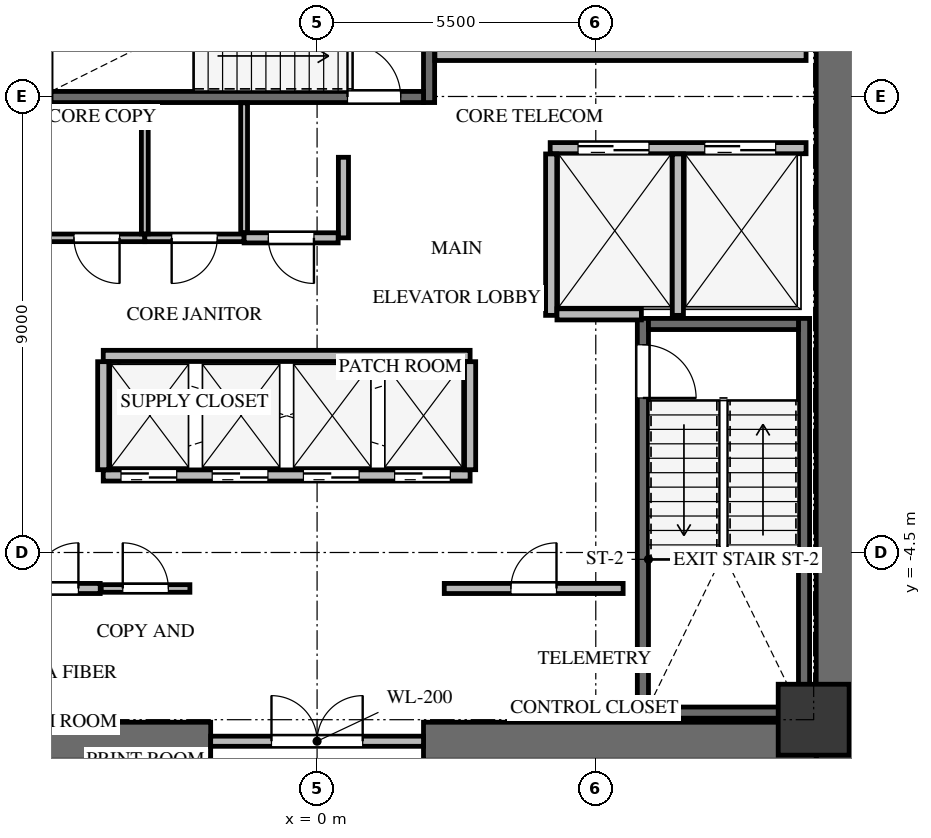
"""IFC4 building model, lengths in metres.
Left out: names, types, materials, properties, quantities, classifications, styles, units other than length and angle.
Written with IfcOpenShell. Run it as: python <this file> out.ifc"""

import sys

from ifc_helpers import new_model, si_unit, direction, frame, frame_2d, origin, origin_2d, place, context, subcontext, project, spatial, rectangle, extrude, source, transform, mapped, element, fill, save


model = new_model("IFC4")
c1 = context("Model", 3, precision=1e-05, world=origin(), true_north=direction((0.0, 1.0)))
c2 = subcontext(c1, "Body", "Model", "MODEL_VIEW")
j1 = project(units=[si_unit("LENGTHUNIT", "METRE"), si_unit("PLANEANGLEUNIT", "RADIAN")], contexts=[c1])
p1 = place(None, origin())
s1 = spatial("IfcSite", under=j1, at=p1, CompositionType="ELEMENT")
p2 = place(p1, origin())
s2 = spatial("IfcBuilding", under=s1, at=p2, CompositionType="ELEMENT")
p3 = place(p2, frame((0.0, 0.0, 146.1)))
s3 = spatial("IfcBuildingStorey", under=s2, at=p3, CompositionType="ELEMENT", Elevation=146.1)
p4 = place(p3, frame((10.225, -8.6, 0.0), z_axis=(0.0, 0.0, 1.0), x_axis=(0.0, 1.0, 0.0)))
e1 = element("IfcWall", 1, at=p4, inside=s3, PredefinedType="SHEAR", context=c2, shape_type="SweptSolid", body=[
    extrude(rectangle(XDim=17.2, YDim=0.75, at=frame_2d((8.6, 0.0))), origin(), (0.0, 0.0, 1.0), 4.2),
])
for number, where, z_axis, x_axis in (
    (2, (-9.85, -8.225, 0.0), (0.0, 0.0, 1.0), (1.0, 0.0, 0.0)),
    (3, (2.1, -8.225, 0.0), (0.0, 0.0, 1.0), (1.0, 0.0, 0.0)),
):
    element("IfcWall", number, at=place(p3, frame(where, z_axis=z_axis, x_axis=x_axis)), inside=s3, PredefinedType="SHEAR", context=c2, shape_type="SweptSolid", body=[
        extrude(rectangle(XDim=7.75, YDim=0.75, at=frame_2d((3.875, 0.0))), origin(), (0.0, 0.0, 1.0), 4.2),
    ])
p5 = place(p3, frame((9.61, -7.77, -0.24), z_axis=(0.0, 0.0, 1.0), x_axis=(0.0, 1.0, 0.0)))
e4 = element("IfcWall", 4, at=p5, inside=s3, PredefinedType="SHEAR", context=c2, shape_type="SweptSolid", body=[
    extrude(rectangle(XDim=7.89, YDim=0.22, at=frame_2d((3.945, 0.0))), origin(), (0.0, 0.0, 1.0), 4.12),
])
p6 = place(p3, frame((6.43, 0.12, -0.24), z_axis=(0.0, 0.0, 1.0), x_axis=(0.0, -1.0, 0.0)))
e5 = element("IfcWall", 5, at=p6, inside=s3, PredefinedType="SHEAR", context=c2, shape_type="SweptSolid", body=[
    extrude(rectangle(XDim=7.89, YDim=0.22, at=frame_2d((3.945, 0.0))), origin(), (0.0, 0.0, 1.0), 4.12),
])
p7 = place(p6, frame((0.52, 0.0, 0.0)))
e6 = element("IfcOpeningElement", 6, at=p7, cuts=e5, PredefinedType="OPENING", context=c2, shape_type="SweptSolid", body=[
    extrude(rectangle(XDim=1.05, YDim=2.15, at=frame_2d((0.525, 1.075))), frame((0.0, 0.12, 0.0), z_axis=(0.0, -1.0, 0.0), x_axis=(1.0, 0.0, 0.0)), (0.0, 0.0, 1.0), 0.24),
])
for number, where, z_axis, x_axis in (
    (7, (6.54, -7.66, -0.24), (0.0, 0.0, 1.0), (1.0, 0.0, 0.0)),
    (8, (9.5, 0.01, -0.24), (0.0, 0.0, 1.0), (-1.0, 0.0, 0.0)),
):
    element("IfcWall", number, at=place(p3, frame(where, z_axis=z_axis, x_axis=x_axis)), inside=s3, PredefinedType="SHEAR", context=c2, shape_type="SweptSolid", body=[
        extrude(rectangle(XDim=2.96, YDim=0.22, at=frame_2d((1.48, 0.0))), origin(), (0.0, 0.0, 1.0), 4.12),
    ])
p8 = place(p3, frame((2.21, 4.38, -0.24), z_axis=(0.0, 0.0, 1.0), x_axis=(0.0, 1.0, 0.0)))
e9 = element("IfcWall", 9, at=p8, inside=s3, PredefinedType="SHEAR", context=c2, shape_type="SweptSolid", body=[
    extrude(rectangle(XDim=3.4, YDim=0.22, at=frame_2d((1.7, 0.0))), origin(), (0.0, 0.0, 1.0), 4.12),
])
p9 = place(p3, frame((-5.25, 4.49, -0.24), z_axis=(0.0, 0.0, 1.0), x_axis=(1.0, 0.0, 0.0)))
e10 = element("IfcWall", 10, at=p9, inside=s3, PredefinedType="SHEAR", context=c2, shape_type="SweptSolid", body=[
    extrude(rectangle(XDim=7.35, YDim=0.22, at=frame_2d((3.675, 0.0))), origin(), (0.0, 0.0, 1.0), 4.12),
])
p10 = place(p9, frame((5.85, 0.0, 0.0)))
e11 = element("IfcOpeningElement", 11, at=p10, cuts=e10, PredefinedType="OPENING", context=c2, shape_type="SweptSolid", body=[
    extrude(rectangle(XDim=1.05, YDim=2.15, at=frame_2d((0.525, 1.075))), frame((0.0, 0.12, 0.0), z_axis=(0.0, -1.0, 0.0), x_axis=(1.0, 0.0, 0.0)), (0.0, 0.0, 1.0), 0.24),
])
m1 = source(origin(), c2, "Body", "SweptSolid", [
    extrude(rectangle(XDim=1.4, YDim=1.4, at=origin_2d()), origin(), (0.0, 0.0, 1.0), 4.12),
])
p11 = place(p3, frame((9.8, -7.8, -0.24), z_axis=(0.0, 0.0, 1.0), x_axis=(1.0, 0.0, 0.0)))
e12 = element("IfcColumn", 12, at=p11, inside=s3, PredefinedType="COLUMN", context=c2, shape_type="MappedRepresentation", body=[
    mapped(m1, transform((0.0, 0.0, 0.0), x_axis=(1.0, 0.0, 0.0), y_axis=(0.0, 1.0, 0.0), z_axis=(0.0, 0.0, 1.0), scale=1.0)),
])
p12 = place(p3, frame((-2.1, -8.225, 0.0), z_axis=(0.0, 0.0, 1.0), x_axis=(1.0, 0.0, 0.0)))
e13 = element("IfcWall", 13, at=p12, inside=s3, PredefinedType="SOLIDWALL", context=c2, shape_type="SweptSolid", body=[
    extrude(rectangle(XDim=4.2, YDim=0.2, at=frame_2d((2.1, 0.0))), origin(), (0.0, 0.0, 1.0), 3.865),
])
p13 = place(p12, frame((1.2, 0.0, 0.0)))
e14 = element("IfcOpeningElement", 14, at=p13, cuts=e13, PredefinedType="OPENING", context=c2, shape_type="SweptSolid", body=[
    extrude(rectangle(XDim=1.8, YDim=2.15, at=frame_2d((0.9, 1.075))), frame((0.0, 0.11, 0.0), z_axis=(0.0, -1.0, 0.0), x_axis=(1.0, 0.0, 0.0)), (0.0, 0.0, 1.0), 0.22),
])
p14 = place(p3, frame((4.6, 3.48, 0.0), z_axis=(0.0, 0.0, 1.0), x_axis=(1.0, 0.0, 0.0)))
e15 = element("IfcWall", 15, at=p14, inside=s3, PredefinedType="SOLIDWALL", context=c2, shape_type="SweptSolid", body=[
    extrude(rectangle(XDim=5.05, YDim=0.22, at=frame_2d((2.525, 0.0))), origin(), (0.0, 0.0, 1.0), 3.865),
])
p15 = place(p14, frame((0.55, 0.0, 0.0)))
e16 = element("IfcOpeningElement", 16, at=p15, cuts=e15, PredefinedType="OPENING", context=c2, shape_type="SweptSolid", body=[
    extrude(rectangle(XDim=1.4, YDim=2.15, at=frame_2d((0.7, 1.075))), frame((0.0, 0.12, 0.0), z_axis=(0.0, -1.0, 0.0), x_axis=(1.0, 0.0, 0.0)), (0.0, 0.0, 1.0), 0.24),
])
p16 = place(p14, frame((3.05, 0.0, 0.0)))
e17 = element("IfcOpeningElement", 17, at=p16, cuts=e15, PredefinedType="OPENING", context=c2, shape_type="SweptSolid", body=[
    extrude(rectangle(XDim=1.4, YDim=2.15, at=frame_2d((0.7, 1.075))), frame((0.0, 0.12, 0.0), z_axis=(0.0, -1.0, 0.0), x_axis=(1.0, 0.0, 0.0)), (0.0, 0.0, 1.0), 0.24),
])
for number, where, z_axis, x_axis in (
    (18, (4.62, 0.18, 0.0), (0.0, 0.0, 1.0), (0.0, 1.0, 0.0)),
    (19, (7.12, 0.18, 0.0), (0.0, 0.0, 1.0), (0.0, 1.0, 0.0)),
):
    element("IfcWall", number, at=place(p3, frame(where, z_axis=z_axis, x_axis=x_axis)), inside=s3, PredefinedType="SOLIDWALL", context=c2, shape_type="SweptSolid", body=[
        extrude(rectangle(XDim=3.186, YDim=0.22, at=frame_2d((1.593, 0.0))), origin(), (0.0, 0.0, 1.0), 3.865),
    ])
p17 = place(p3, frame((4.734, 0.2, 0.0), z_axis=(0.0, 0.0, 1.0), x_axis=(1.0, 0.0, 0.0)))
e20 = element("IfcWall", 20, at=p17, inside=s3, PredefinedType="SOLIDWALL", context=c2, shape_type="SweptSolid", body=[
    extrude(rectangle(XDim=1.666, YDim=0.22, at=frame_2d((0.833, 0.0))), origin(), (0.0, 0.0, 1.0), 3.865),
])
p18 = place(p3, frame((-4.22, -2.98, 0.0), z_axis=(0.0, 0.0, 1.0), x_axis=(1.0, 0.0, 0.0)))
e21 = element("IfcWall", 21, at=p18, inside=s3, PredefinedType="SOLIDWALL", context=c2, shape_type="SweptSolid", body=[
    extrude(rectangle(XDim=7.24, YDim=0.22, at=frame_2d((3.62, 0.0))), origin(), (0.0, 0.0, 1.0), 3.865),
])
p19 = place(p18, frame((0.35, 0.0, 0.0)))
e22 = element("IfcOpeningElement", 22, at=p19, cuts=e21, PredefinedType="OPENING", context=c2, shape_type="SweptSolid", body=[
    extrude(rectangle(XDim=1.1, YDim=2.15, at=frame_2d((0.55, 1.075))), frame((0.0, 0.12, 0.0), z_axis=(0.0, -1.0, 0.0), x_axis=(1.0, 0.0, 0.0)), (0.0, 0.0, 1.0), 0.24),
])
p20 = place(p18, frame((2.15, 0.0, 0.0)))
e23 = element("IfcOpeningElement", 23, at=p20, cuts=e21, PredefinedType="OPENING", context=c2, shape_type="SweptSolid", body=[
    extrude(rectangle(XDim=1.1, YDim=2.15, at=frame_2d((0.55, 1.075))), frame((0.0, 0.12, 0.0), z_axis=(0.0, -1.0, 0.0), x_axis=(1.0, 0.0, 0.0)), (0.0, 0.0, 1.0), 0.24),
])
p21 = place(p18, frame((3.95, 0.0, 0.0)))
e24 = element("IfcOpeningElement", 24, at=p21, cuts=e21, PredefinedType="OPENING", context=c2, shape_type="SweptSolid", body=[
    extrude(rectangle(XDim=1.1, YDim=2.15, at=frame_2d((0.55, 1.075))), frame((0.0, 0.12, 0.0), z_axis=(0.0, -1.0, 0.0), x_axis=(1.0, 0.0, 0.0)), (0.0, 0.0, 1.0), 0.24),
])
p22 = place(p18, frame((5.75, 0.0, 0.0)))
e25 = element("IfcOpeningElement", 25, at=p22, cuts=e21, PredefinedType="OPENING", context=c2, shape_type="SweptSolid", body=[
    extrude(rectangle(XDim=1.1, YDim=2.15, at=frame_2d((0.55, 1.075))), frame((0.0, 0.12, 0.0), z_axis=(0.0, -1.0, 0.0), x_axis=(1.0, 0.0, 0.0)), (0.0, 0.0, 1.0), 0.24),
])
p23 = place(p3, frame((-4.22, -0.62, 0.0), z_axis=(0.0, 0.0, 1.0), x_axis=(1.0, 0.0, 0.0)))
e26 = element("IfcWall", 26, at=p23, inside=s3, PredefinedType="SOLIDWALL", context=c2, shape_type="SweptSolid", body=[
    extrude(rectangle(XDim=7.24, YDim=0.22, at=frame_2d((3.62, 0.0))), origin(), (0.0, 0.0, 1.0), 3.865),
])
for number, where, z_axis, x_axis in (
    (27, (-4.22, -2.866, 0.0), (0.0, 0.0, 1.0), (0.0, 1.0, 0.0)),
    (28, (3.02, -2.866, 0.0), (0.0, 0.0, 1.0), (0.0, 1.0, 0.0)),
):
    element("IfcWall", number, at=place(p3, frame(where, z_axis=z_axis, x_axis=x_axis)), inside=s3, PredefinedType="SOLIDWALL", context=c2, shape_type="SweptSolid", body=[
        extrude(rectangle(XDim=2.132, YDim=0.22, at=frame_2d((1.066, 0.0))), origin(), (0.0, 0.0, 1.0), 3.865),
    ])
p24 = place(p3, frame((2.325, 5.32, 0.0), z_axis=(0.0, 0.0, 1.0), x_axis=(1.0, 0.0, 0.0)))
e29 = element("IfcWall", 29, at=p24, inside=s3, PredefinedType="SOLIDWALL", context=c2, shape_type="SweptSolid", body=[
    extrude(rectangle(XDim=7.325, YDim=0.22, at=frame_2d((3.663, 0.0))), origin(), (0.0, 0.0, 1.0), 3.865),
])
p25 = place(p3, frame((-6.04, -5.21, 0.0), z_axis=(0.0, 0.0, 1.0), x_axis=(1.0, 0.0, 0.0)))
e30 = element("IfcWall", 30, at=p25, inside=s3, PredefinedType="SOLIDWALL", context=c2, shape_type="SweptSolid", body=[
    extrude(rectangle(XDim=1.76, YDim=0.2, at=frame_2d((0.88, 0.0))), origin(), (0.0, 0.0, 1.0), 3.865),
])
p26 = place(p25, frame((0.43, 0.0, 0.0)))
e31 = element("IfcOpeningElement", 31, at=p26, cuts=e30, PredefinedType="OPENING", context=c2, shape_type="SweptSolid", body=[
    extrude(rectangle(XDim=0.9, YDim=2.05, at=frame_2d((0.45, 1.025))), frame((0.0, 0.11, 0.0), z_axis=(0.0, -1.0, 0.0), x_axis=(1.0, 0.0, 0.0)), (0.0, 0.0, 1.0), 0.22),
])
p27 = place(p3, frame((-4.26, -5.21, 0.0), z_axis=(0.0, 0.0, 1.0), x_axis=(1.0, 0.0, 0.0)))
e32 = element("IfcWall", 32, at=p27, inside=s3, PredefinedType="PARTITIONING", context=c2, shape_type="SweptSolid", body=[
    extrude(rectangle(XDim=1.75, YDim=0.15, at=frame_2d((0.875, 0.0))), origin(), (0.0, 0.0, 1.0), 3.865),
])
p28 = place(p27, frame((0.425, 0.0, 0.0)))
e33 = element("IfcOpeningElement", 33, at=p28, cuts=e32, PredefinedType="OPENING", context=c2, shape_type="SweptSolid", body=[
    extrude(rectangle(XDim=0.9, YDim=2.05, at=frame_2d((0.45, 1.025))), frame((0.0, 0.085, 0.0), z_axis=(0.0, -1.0, 0.0), x_axis=(1.0, 0.0, 0.0)), (0.0, 0.0, 1.0), 0.17),
])
p29 = place(p3, frame((2.51, -5.21, 0.0), z_axis=(0.0, 0.0, 1.0), x_axis=(1.0, 0.0, 0.0)))
e34 = element("IfcWall", 34, at=p29, inside=s3, PredefinedType="SOLIDWALL", context=c2, shape_type="SweptSolid", body=[
    extrude(rectangle(XDim=3.53, YDim=0.2, at=frame_2d((1.765, 0.0))), origin(), (0.0, 0.0, 1.0), 3.865),
])
p30 = place(p29, frame((1.315, 0.0, 0.0)))
e35 = element("IfcOpeningElement", 35, at=p30, cuts=e34, PredefinedType="OPENING", context=c2, shape_type="SweptSolid", body=[
    extrude(rectangle(XDim=0.9, YDim=2.05, at=frame_2d((0.45, 1.025))), frame((0.0, 0.11, 0.0), z_axis=(0.0, -1.0, 0.0), x_axis=(1.0, 0.0, 0.0)), (0.0, 0.0, 1.0), 0.22),
])
p31 = place(p3, frame((-3.4, 1.71, 0.0), z_axis=(0.0, 0.0, 1.0), x_axis=(-1.0, 0.0, 0.0)))
e36 = element("IfcWall", 36, at=p31, inside=s3, PredefinedType="PARTITIONING", context=c2, shape_type="SweptSolid", body=[
    extrude(rectangle(XDim=1.896, YDim=0.15, at=frame_2d((0.948, 0.0))), origin(), (0.0, 0.0, 1.0), 3.865),
])
p32 = place(p31, frame((0.498, 0.0, 0.0)))
e37 = element("IfcOpeningElement", 37, at=p32, cuts=e36, PredefinedType="OPENING", context=c2, shape_type="SweptSolid", body=[
    extrude(rectangle(XDim=0.9, YDim=2.05, at=frame_2d((0.45, 1.025))), frame((0.0, 0.085, 0.0), z_axis=(0.0, -1.0, 0.0), x_axis=(1.0, 0.0, 0.0)), (0.0, 0.0, 1.0), 0.17),
])
p33 = place(p3, frame((-1.44, 1.71, 0.0), z_axis=(0.0, 0.0, 1.0), x_axis=(-1.0, 0.0, 0.0)))
e38 = element("IfcWall", 38, at=p33, inside=s3, PredefinedType="PARTITIONING", context=c2, shape_type="SweptSolid", body=[
    extrude(rectangle(XDim=1.96, YDim=0.15, at=frame_2d((0.98, 0.0))), origin(), (0.0, 0.0, 1.0), 3.865),
])
p34 = place(p33, frame((0.53, 0.0, 0.0)))
e39 = element("IfcOpeningElement", 39, at=p34, cuts=e38, PredefinedType="OPENING", context=c2, shape_type="SweptSolid", body=[
    extrude(rectangle(XDim=0.9, YDim=2.05, at=frame_2d((0.45, 1.025))), frame((0.0, 0.085, 0.0), z_axis=(0.0, -1.0, 0.0), x_axis=(1.0, 0.0, 0.0)), (0.0, 0.0, 1.0), 0.17),
])
p35 = place(p3, frame((0.52, 3.3, 0.0), z_axis=(0.0, 0.0, 1.0), x_axis=(0.0, -1.0, 0.0)))
e40 = element("IfcWall", 40, at=p35, inside=s3, PredefinedType="SOLIDWALL", context=c2, shape_type="SweptSolid", body=[
    extrude(rectangle(XDim=1.59, YDim=0.2, at=frame_2d((0.795, 0.0))), origin(), (0.0, 0.0, 1.0), 3.865),
])
p36 = place(p3, frame((0.416, 1.71, 0.0), z_axis=(0.0, 0.0, 1.0), x_axis=(-1.0, 0.0, 0.0)))
e41 = element("IfcWall", 41, at=p36, inside=s3, PredefinedType="SOLIDWALL", context=c2, shape_type="SweptSolid", body=[
    extrude(rectangle(XDim=1.856, YDim=0.2, at=frame_2d((0.928, 0.0))), origin(), (0.0, 0.0, 1.0), 3.865),
])
p37 = place(p36, frame((0.478, 0.0, 0.0)))
e42 = element("IfcOpeningElement", 42, at=p37, cuts=e41, PredefinedType="OPENING", context=c2, shape_type="SweptSolid", body=[
    extrude(rectangle(XDim=0.9, YDim=2.05, at=frame_2d((0.45, 1.025))), frame((0.0, 0.11, 0.0), z_axis=(0.0, -1.0, 0.0), x_axis=(1.0, 0.0, 0.0)), (0.0, 0.0, 1.0), 0.22),
])
p38 = place(p3, frame((-3.4, 4.375, 0.0), z_axis=(0.0, 0.0, 1.0), x_axis=(0.0, -1.0, 0.0)))
e43 = element("IfcWall", 43, at=p38, inside=s3, PredefinedType="PARTITIONING", context=c2, shape_type="SweptSolid", body=[
    extrude(rectangle(XDim=2.586, YDim=0.135, at=frame_2d((1.293, 0.0))), origin(), (0.0, 0.0, 1.0), 3.865),
])
p39 = place(p3, frame((-1.44, 4.375, 0.0), z_axis=(0.0, 0.0, 1.0), x_axis=(0.0, -1.0, 0.0)))
e44 = element("IfcWall", 44, at=p39, inside=s3, PredefinedType="PARTITIONING", context=c2, shape_type="SweptSolid", body=[
    extrude(rectangle(XDim=2.561, YDim=0.135, at=frame_2d((1.281, 0.0))), origin(), (0.0, 0.0, 1.0), 3.865),
])
m2 = source(origin(), c2, "Body", "SweptSolid", [
    extrude(rectangle(XDim=1.05, YDim=2.15, at=frame_2d((0.525, 1.075))), frame((0.0, 0.025, 0.0), z_axis=(0.0, -1.0, 0.0), x_axis=(1.0, 0.0, 0.0)), (0.0, 0.0, 1.0), 0.05),
])
p40 = place(p7, origin())
e45 = element("IfcDoor", 45, at=p40, inside=s3, OperationType="SINGLE_SWING_RIGHT", PredefinedType="DOOR", context=c2, shape_type="MappedRepresentation", body=[
    mapped(m2, transform((0.0, 0.0, 0.0), x_axis=(1.0, 0.0, 0.0), y_axis=(0.0, 1.0, 0.0), z_axis=(0.0, 0.0, 1.0), scale=1.0)),
])
fill(e6, e45)
m3 = source(origin(), c2, "Body", "SweptSolid", [
    extrude(rectangle(XDim=1.05, YDim=2.15, at=frame_2d((0.525, 1.075))), frame((0.0, 0.025, 0.0), z_axis=(0.0, -1.0, 0.0), x_axis=(1.0, 0.0, 0.0)), (0.0, 0.0, 1.0), 0.05),
])
p41 = place(p10, origin())
e46 = element("IfcDoor", 46, at=p41, inside=s3, OperationType="SINGLE_SWING_LEFT", PredefinedType="DOOR", context=c2, shape_type="MappedRepresentation", body=[
    mapped(m3, transform((0.0, 0.0, 0.0), x_axis=(1.0, 0.0, 0.0), y_axis=(0.0, 1.0, 0.0), z_axis=(0.0, 0.0, 1.0), scale=1.0)),
])
fill(e11, e46)
m4 = source(origin(), c2, "Body", "SweptSolid", [
    extrude(rectangle(XDim=1.8, YDim=2.15, at=frame_2d((0.9, 1.075))), frame((0.0, 0.025, 0.0), z_axis=(0.0, -1.0, 0.0), x_axis=(1.0, 0.0, 0.0)), (0.0, 0.0, 1.0), 0.05),
])
p42 = place(p13, origin())
e47 = element("IfcDoor", 47, at=p42, inside=s3, OperationType="DOUBLE_DOOR_SINGLE_SWING", PredefinedType="DOOR", context=c2, shape_type="MappedRepresentation", body=[
    mapped(m4, transform((0.0, 0.0, 0.0), x_axis=(1.0, 0.0, 0.0), y_axis=(0.0, 1.0, 0.0), z_axis=(0.0, 0.0, 1.0), scale=1.0)),
])
fill(e14, e47)
m5 = source(origin(), c2, "Body", "SweptSolid", [
    extrude(rectangle(XDim=1.4, YDim=2.15, at=frame_2d((0.7, 1.075))), frame((0.0, 0.025, 0.0), z_axis=(0.0, -1.0, 0.0), x_axis=(1.0, 0.0, 0.0)), (0.0, 0.0, 1.0), 0.05),
])
p43 = place(p15, origin())
e48 = element("IfcDoor", 48, at=p43, inside=s3, OperationType="DOUBLE_DOOR_SLIDING", PredefinedType="DOOR", context=c2, shape_type="MappedRepresentation", body=[
    mapped(m5, transform((0.0, 0.0, 0.0), x_axis=(1.0, 0.0, 0.0), y_axis=(0.0, 1.0, 0.0), z_axis=(0.0, 0.0, 1.0), scale=1.0)),
])
fill(e16, e48)
p44 = place(p16, origin())
e49 = element("IfcDoor", 49, at=p44, inside=s3, OperationType="DOUBLE_DOOR_SLIDING", PredefinedType="DOOR", context=c2, shape_type="MappedRepresentation", body=[
    mapped(m5, transform((0.0, 0.0, 0.0), x_axis=(1.0, 0.0, 0.0), y_axis=(0.0, 1.0, 0.0), z_axis=(0.0, 0.0, 1.0), scale=1.0)),
])
fill(e17, e49)
m6 = source(origin(), c2, "Body", "SweptSolid", [
    extrude(rectangle(XDim=1.1, YDim=2.15, at=frame_2d((0.55, 1.075))), frame((0.0, 0.025, 0.0), z_axis=(0.0, -1.0, 0.0), x_axis=(1.0, 0.0, 0.0)), (0.0, 0.0, 1.0), 0.05),
])
p45 = place(p19, origin())
e50 = element("IfcDoor", 50, at=p45, inside=s3, OperationType="DOUBLE_DOOR_SLIDING", PredefinedType="DOOR", context=c2, shape_type="MappedRepresentation", body=[
    mapped(m6, transform((0.0, 0.0, 0.0), x_axis=(1.0, 0.0, 0.0), y_axis=(0.0, 1.0, 0.0), z_axis=(0.0, 0.0, 1.0), scale=1.0)),
])
fill(e22, e50)
p46 = place(p20, origin())
e51 = element("IfcDoor", 51, at=p46, inside=s3, OperationType="DOUBLE_DOOR_SLIDING", PredefinedType="DOOR", context=c2, shape_type="MappedRepresentation", body=[
    mapped(m6, transform((0.0, 0.0, 0.0), x_axis=(1.0, 0.0, 0.0), y_axis=(0.0, 1.0, 0.0), z_axis=(0.0, 0.0, 1.0), scale=1.0)),
])
fill(e23, e51)
p47 = place(p21, origin())
e52 = element("IfcDoor", 52, at=p47, inside=s3, OperationType="DOUBLE_DOOR_SLIDING", PredefinedType="DOOR", context=c2, shape_type="MappedRepresentation", body=[
    mapped(m6, transform((0.0, 0.0, 0.0), x_axis=(1.0, 0.0, 0.0), y_axis=(0.0, 1.0, 0.0), z_axis=(0.0, 0.0, 1.0), scale=1.0)),
])
fill(e24, e52)
p48 = place(p22, origin())
e53 = element("IfcDoor", 53, at=p48, inside=s3, OperationType="DOUBLE_DOOR_SLIDING", PredefinedType="DOOR", context=c2, shape_type="MappedRepresentation", body=[
    mapped(m6, transform((0.0, 0.0, 0.0), x_axis=(1.0, 0.0, 0.0), y_axis=(0.0, 1.0, 0.0), z_axis=(0.0, 0.0, 1.0), scale=1.0)),
])
fill(e25, e53)
m7 = source(origin(), c2, "Body", "SweptSolid", [
    extrude(rectangle(XDim=0.9, YDim=2.05, at=frame_2d((0.45, 1.025))), frame((0.0, 0.025, 0.0), z_axis=(0.0, -1.0, 0.0), x_axis=(1.0, 0.0, 0.0)), (0.0, 0.0, 1.0), 0.05),
])
p49 = place(p26, origin())
e54 = element("IfcDoor", 54, at=p49, inside=s3, OperationType="SINGLE_SWING_RIGHT", PredefinedType="DOOR", context=c2, shape_type="MappedRepresentation", body=[
    mapped(m7, transform((0.0, 0.0, 0.0), x_axis=(1.0, 0.0, 0.0), y_axis=(0.0, 1.0, 0.0), z_axis=(0.0, 0.0, 1.0), scale=1.0)),
])
fill(e31, e54)
m8 = source(origin(), c2, "Body", "SweptSolid", [
    extrude(rectangle(XDim=0.9, YDim=2.05, at=frame_2d((0.45, 1.025))), frame((0.0, 0.025, 0.0), z_axis=(0.0, -1.0, 0.0), x_axis=(1.0, 0.0, 0.0)), (0.0, 0.0, 1.0), 0.05),
])
p50 = place(p28, origin())
e55 = element("IfcDoor", 55, at=p50, inside=s3, OperationType="SINGLE_SWING_LEFT", PredefinedType="DOOR", context=c2, shape_type="MappedRepresentation", body=[
    mapped(m8, transform((0.0, 0.0, 0.0), x_axis=(1.0, 0.0, 0.0), y_axis=(0.0, 1.0, 0.0), z_axis=(0.0, 0.0, 1.0), scale=1.0)),
])
fill(e33, e55)
p51 = place(p30, origin())
e56 = element("IfcDoor", 56, at=p51, inside=s3, OperationType="SINGLE_SWING_RIGHT", PredefinedType="DOOR", context=c2, shape_type="MappedRepresentation", body=[
    mapped(m7, transform((0.0, 0.0, 0.0), x_axis=(1.0, 0.0, 0.0), y_axis=(0.0, 1.0, 0.0), z_axis=(0.0, 0.0, 1.0), scale=1.0)),
])
fill(e35, e56)
p52 = place(p32, origin())
e57 = element("IfcDoor", 57, at=p52, inside=s3, OperationType="SINGLE_SWING_LEFT", PredefinedType="DOOR", context=c2, shape_type="MappedRepresentation", body=[
    mapped(m8, transform((0.0, 0.0, 0.0), x_axis=(1.0, 0.0, 0.0), y_axis=(0.0, 1.0, 0.0), z_axis=(0.0, 0.0, 1.0), scale=1.0)),
])
fill(e37, e57)
p53 = place(p34, origin())
e58 = element("IfcDoor", 58, at=p53, inside=s3, OperationType="SINGLE_SWING_RIGHT", PredefinedType="DOOR", context=c2, shape_type="MappedRepresentation", body=[
    mapped(m7, transform((0.0, 0.0, 0.0), x_axis=(1.0, 0.0, 0.0), y_axis=(0.0, 1.0, 0.0), z_axis=(0.0, 0.0, 1.0), scale=1.0)),
])
fill(e39, e58)
p54 = place(p37, origin())
e59 = element("IfcDoor", 59, at=p54, inside=s3, OperationType="SINGLE_SWING_LEFT", PredefinedType="DOOR", context=c2, shape_type="MappedRepresentation", body=[
    mapped(m8, transform((0.0, 0.0, 0.0), x_axis=(1.0, 0.0, 0.0), y_axis=(0.0, 1.0, 0.0), z_axis=(0.0, 0.0, 1.0), scale=1.0)),
])
fill(e42, e59)
save(model, sys.argv[1])
